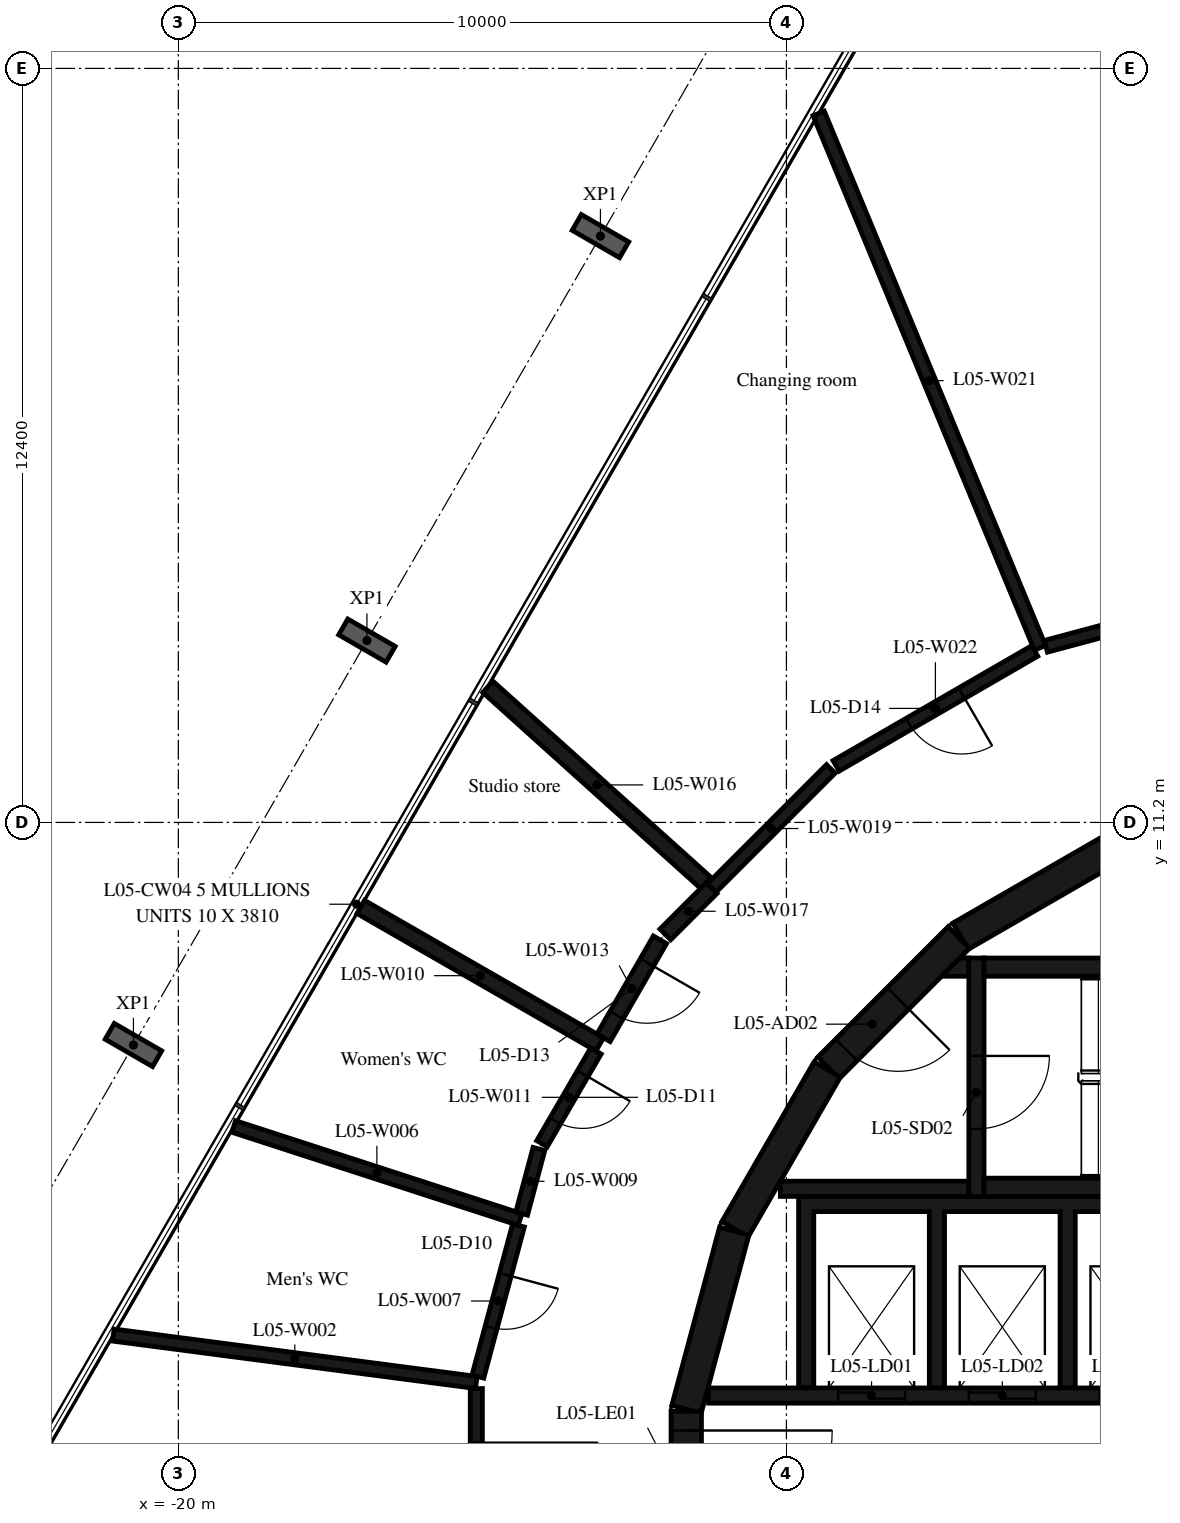
"""IFC4 building model, lengths in metres.
Left out: names, types, materials, properties, quantities, classifications, styles, units other than length and angle.
Written with IfcOpenShell. Run it as: python <this file> out.ifc"""

import sys

from ifc_helpers import new_model, si_unit, direction, frame, frame_2d, origin, origin_2d, place, context, subcontext, project, spatial, polyline, rectangle, i_section, outline, extrude, element, fill, save


model = new_model("IFC4")
c1 = context("Model", 3, precision=1e-05, world=origin(), true_north=direction((0.0, 1.0)))
c2 = subcontext(c1, "Body", "Model", "MODEL_VIEW")
j1 = project(units=[si_unit("LENGTHUNIT", "METRE"), si_unit("PLANEANGLEUNIT", "RADIAN")], contexts=[c1])
p1 = place(None, origin())
s1 = spatial("IfcSite", under=j1, at=p1, CompositionType="ELEMENT")
p2 = place(p1, origin())
s2 = spatial("IfcBuilding", under=s1, at=p2, CompositionType="ELEMENT")
p3 = place(p2, frame((0.0, 0.0, 28.2)))
s3 = spatial("IfcBuildingStorey", under=s2, at=p3, CompositionType="ELEMENT", Elevation=28.2)
for number, where, z_axis, x_axis in (
    (1, (-13.059, 20.842, -0.38), (0.0, 0.0, 1.0), (0.5, 0.866, 0.0)),
    (2, (-16.899, 14.19, -0.38), (0.0, 0.0, 1.0), (0.5, 0.866, 0.0)),
    (3, (-20.739, 7.539, -0.38), (0.0, 0.0, 1.0), (0.5, 0.866, 0.0)),
):
    element("IfcColumn", number, at=place(p3, frame(where, z_axis=z_axis, x_axis=x_axis)), inside=s3, PredefinedType="COLUMN", context=c2, shape_type="SweptSolid", body=[
        extrude(i_section(OverallWidth=0.3, OverallDepth=0.9, WebThickness=0.019, FlangeThickness=0.035, FilletRadius=0.03, at=origin_2d()), origin(), (0.0, 0.0, 1.0), 4.73),
    ])
p4 = place(p3, frame((-4.51, 10.845, 0.0), z_axis=(0.0, 0.0, 1.0), x_axis=(-0.865975092491, -0.500087131594, 0.0)))
e4 = element("IfcWall", 4, at=p4, inside=s3, PredefinedType="SHEAR", context=c2, shape_type="SweptSolid", body=[
    extrude(rectangle(XDim=3.033, YDim=0.5, at=frame_2d((1.516, 0.0))), origin(), (0.0, 0.0, 1.0), 4.35),
])
p5 = place(p3, frame((-7.164, 9.308, 0.0), z_axis=(0.0, 0.0, 1.0), x_axis=(-0.707106781187, -0.707106781187, 0.0)))
e5 = element("IfcWall", 5, at=p5, inside=s3, PredefinedType="SHEAR", context=c2, shape_type="SweptSolid", body=[
    extrude(rectangle(XDim=3.032, YDim=0.5, at=frame_2d((1.516, 0.0))), origin(), (0.0, 0.0, 1.0), 4.35),
])
p6 = place(p5, frame((1.416, 0.0, 0.0)))
e6 = element("IfcOpeningElement", 6, at=p6, cuts=e5, PredefinedType="OPENING", context=c2, shape_type="SweptSolid", body=[
    extrude(rectangle(XDim=1.2, YDim=2.1, at=frame_2d((0.6, 1.05))), frame((0.0, 0.26, 0.0), z_axis=(0.0, -1.0, 0.0), x_axis=(1.0, 0.0, 0.0)), (0.0, 0.0, 1.0), 0.52),
])
for number, where, z_axis, x_axis in (
    (7, (-9.329, 7.137, 0.0), (0.0, 0.0, 1.0), (-0.5, -0.866, 0.0)),
    (8, (-10.858, 4.479, 0.0), (0.0, 0.0, 1.0), (-0.259, -0.966, 0.0)),
):
    element("IfcWall", number, at=place(p3, frame(where, z_axis=z_axis, x_axis=x_axis)), inside=s3, PredefinedType="SHEAR", context=c2, shape_type="SweptSolid", body=[
        extrude(rectangle(XDim=3.033, YDim=0.5, at=frame_2d((1.516, 0.0))), origin(), (0.0, 0.0, 1.0), 4.35),
    ])
p7 = place(p3, frame((-11.647, 1.516, 0.0), z_axis=(0.0, 0.0, 1.0), x_axis=(0.0, -1.0, 0.0)))
e9 = element("IfcWall", 9, at=p7, inside=s3, PredefinedType="SHEAR", context=c2, shape_type="SweptSolid", body=[
    extrude(rectangle(XDim=3.033, YDim=0.5, at=frame_2d((1.516, 0.0))), origin(), (0.0, 0.0, 1.0), 4.35),
])
p8 = place(p7, frame((0.316, 0.0, 0.0)))
e10 = element("IfcOpeningElement", 10, at=p8, cuts=e9, PredefinedType="OPENING", context=c2, shape_type="SweptSolid", body=[
    extrude(rectangle(XDim=2.4, YDim=2.1, at=frame_2d((1.2, 1.05))), frame((0.0, 0.26, 0.0), z_axis=(0.0, -1.0, 0.0), x_axis=(1.0, 0.0, 0.0)), (0.0, 0.0, 1.0), 0.52),
])
for number, where, z_axis, x_axis in (
    (11, (-6.75, 5.2, 0.0), (0.0, 0.0, 1.0), (1.0, 0.0, 0.0)),
    (12, (-6.75, 8.82, 0.0), (0.0, 0.0, 1.0), (1.0, 0.0, 0.0)),
):
    element("IfcWall", number, at=place(p3, frame(where, z_axis=z_axis, x_axis=x_axis)), inside=s3, PredefinedType="SHEAR", context=c2, shape_type="SweptSolid", body=[
        extrude(rectangle(XDim=6.75, YDim=0.3, at=frame_2d((3.375, 0.0))), origin(), (0.0, 0.0, 1.0), 4.35),
    ])
p9 = place(p3, frame((-6.875, 8.97, 0.0), z_axis=(0.0, 0.0, 1.0), x_axis=(0.0, -1.0, 0.0)))
e13 = element("IfcWall", 13, at=p9, inside=s3, PredefinedType="SHEAR", context=c2, shape_type="SweptSolid", body=[
    extrude(rectangle(XDim=3.92, YDim=0.25, at=frame_2d((1.96, 0.0))), origin(), (0.0, 0.0, 1.0), 4.35),
])
p10 = place(p9, frame((1.61, 0.0, 0.0)))
e14 = element("IfcOpeningElement", 14, at=p10, cuts=e13, PredefinedType="OPENING", context=c2, shape_type="SweptSolid", body=[
    extrude(rectangle(XDim=1.2, YDim=2.1, at=frame_2d((0.6, 1.05))), frame((0.0, 0.135, 0.0), z_axis=(0.0, -1.0, 0.0), x_axis=(1.0, 0.0, 0.0)), (0.0, 0.0, 1.0), 0.27),
])
p11 = place(p3, frame((-7.0, 5.175, 0.0), z_axis=(0.0, 0.0, 1.0), x_axis=(-1.0, 0.0, 0.0)))
e15 = element("IfcWall", 15, at=p11, inside=s3, PredefinedType="SHEAR", context=c2, shape_type="SweptSolid", body=[
    extrude(rectangle(XDim=3.1, YDim=0.25, at=frame_2d((1.55, 0.0))), origin(), (0.0, 0.0, 1.0), 4.35),
])
p12 = place(p3, origin())
e16 = element("IfcWall", 16, at=p12, inside=s3, PredefinedType="SHEAR", context=c2, shape_type="SweptSolid", body=[
    extrude(outline(polyline([(-7.148, 8.97), (-7.0, 8.97), (-7.0, 8.67), (-7.448, 8.67), (-7.148, 8.97)])), origin(), (0.0, 0.0, 1.0), 4.35),
])
p13 = place(p3, origin())
e17 = element("IfcWall", 17, at=p13, inside=s3, PredefinedType="SHEAR", context=c2, shape_type="SweptSolid", body=[
    extrude(outline(polyline([(-9.55, 4.8), (-7.65, 4.8), (-7.65, 1.9), (-7.4, 1.9), (-7.4, 4.8), (-5.5, 4.8), (-5.5, 1.9), (-5.25, 1.9), (-5.25, 4.8), (-3.35, 4.8), (-3.35, 1.9), (-3.1, 1.9), (-3.1, 4.8), (-1.2, 4.8), (-1.2, 1.9), (-0.95, 1.9), (-0.95, 4.8), (0.95, 4.8), (0.95, 1.9), (1.2, 1.9), (1.2, 4.8), (3.1, 4.8), (3.1, 1.9), (3.35, 1.9), (3.35, 4.8), (5.25, 4.8), (5.25, 1.9), (5.5, 1.9), (5.5, 4.8), (7.4, 4.8), (7.4, 1.9), (7.65, 1.9), (7.65, 4.8), (9.55, 4.8), (9.55, 1.9), (9.8, 1.9), (9.8, 4.8), (9.8, 5.05), (-9.8, 5.05), (-9.8, 4.8), (-9.8, 1.9), (-9.55, 1.9), (-9.55, 4.8)])), origin(), (0.0, 0.0, 1.0), 4.35),
])
p14 = place(p3, frame((-11.28, 1.775, 0.0), z_axis=(0.0, 0.0, 1.0), x_axis=(1.0, 0.0, 0.0)))
e18 = element("IfcWall", 18, at=p14, inside=s3, PredefinedType="SHEAR", context=c2, shape_type="SweptSolid", body=[
    extrude(rectangle(XDim=14.38, YDim=0.25, at=frame_2d((7.19, 0.0))), origin(), (0.0, 0.0, 1.0), 4.35),
])
p15 = place(p14, frame((2.13, 0.0, 0.0)))
e19 = element("IfcOpeningElement", 19, at=p15, cuts=e18, PredefinedType="OPENING", context=c2, shape_type="SweptSolid", body=[
    extrude(rectangle(XDim=1.1, YDim=2.1, at=frame_2d((0.55, 1.05))), frame((0.0, 0.135, 0.0), z_axis=(0.0, -1.0, 0.0), x_axis=(1.0, 0.0, 0.0)), (0.0, 0.0, 1.0), 0.27),
])
p16 = place(p14, frame((4.28, 0.0, 0.0)))
e20 = element("IfcOpeningElement", 20, at=p16, cuts=e18, PredefinedType="OPENING", context=c2, shape_type="SweptSolid", body=[
    extrude(rectangle(XDim=1.1, YDim=2.1, at=frame_2d((0.55, 1.05))), frame((0.0, 0.135, 0.0), z_axis=(0.0, -1.0, 0.0), x_axis=(1.0, 0.0, 0.0)), (0.0, 0.0, 1.0), 0.27),
])
p17 = place(p14, frame((6.43, 0.0, 0.0)))
e21 = element("IfcOpeningElement", 21, at=p17, cuts=e18, PredefinedType="OPENING", context=c2, shape_type="SweptSolid", body=[
    extrude(rectangle(XDim=1.1, YDim=2.1, at=frame_2d((0.55, 1.05))), frame((0.0, 0.135, 0.0), z_axis=(0.0, -1.0, 0.0), x_axis=(1.0, 0.0, 0.0)), (0.0, 0.0, 1.0), 0.27),
])
p18 = place(p14, frame((8.58, 0.0, 0.0)))
e22 = element("IfcOpeningElement", 22, at=p18, cuts=e18, PredefinedType="OPENING", context=c2, shape_type="SweptSolid", body=[
    extrude(rectangle(XDim=1.1, YDim=2.1, at=frame_2d((0.55, 1.05))), frame((0.0, 0.135, 0.0), z_axis=(0.0, -1.0, 0.0), x_axis=(1.0, 0.0, 0.0)), (0.0, 0.0, 1.0), 0.27),
])
p19 = place(p14, frame((10.83, 0.0, 0.0)))
e23 = element("IfcOpeningElement", 23, at=p19, cuts=e18, PredefinedType="OPENING", context=c2, shape_type="SweptSolid", body=[
    extrude(rectangle(XDim=0.9, YDim=2.1, at=frame_2d((0.45, 1.05))), frame((0.0, 0.135, 0.0), z_axis=(0.0, -1.0, 0.0), x_axis=(1.0, 0.0, 0.0)), (0.0, 0.0, 1.0), 0.27),
])
p20 = place(p14, frame((12.98, 0.0, 0.0)))
e24 = element("IfcOpeningElement", 24, at=p20, cuts=e18, PredefinedType="OPENING", context=c2, shape_type="SweptSolid", body=[
    extrude(rectangle(XDim=0.9, YDim=2.1, at=frame_2d((0.45, 1.05))), frame((0.0, 0.135, 0.0), z_axis=(0.0, -1.0, 0.0), x_axis=(1.0, 0.0, 0.0)), (0.0, 0.0, 1.0), 0.27),
])
p21 = place(p3, frame((-15.1, 1.99, 0.0), z_axis=(0.0, 0.0, 1.0), x_axis=(-0.991571896529, 0.129557608858, 0.0)))
e25 = element("IfcWall", 25, at=p21, inside=s3, PredefinedType="PARTITIONING", context=c2, shape_type="SweptSolid", body=[
    extrude(rectangle(XDim=6.021, YDim=0.2, at=frame_2d((3.01, 0.0))), origin(), (0.0, 0.0, 1.0), 4.35),
])
p22 = place(p3, frame((-15.1, 1.89, 0.0), z_axis=(0.0, 0.0, 1.0), x_axis=(0.0, -1.0, 0.0)))
e26 = element("IfcWall", 26, at=p22, inside=s3, PredefinedType="PARTITIONING", context=c2, shape_type="SweptSolid", body=[
    extrude(rectangle(XDim=3.78, YDim=0.2, at=frame_2d((1.89, 0.0))), origin(), (0.0, 0.0, 1.0), 4.35),
])
p23 = place(p22, frame((0.89, 0.0, 0.0)))
e27 = element("IfcOpeningElement", 27, at=p23, cuts=e26, PredefinedType="OPENING", context=c2, shape_type="SweptSolid", body=[
    extrude(rectangle(XDim=2.0, YDim=2.1, at=frame_2d((1.0, 1.05))), frame((0.0, 0.11, 0.0), z_axis=(0.0, -1.0, 0.0), x_axis=(1.0, 0.0, 0.0)), (0.0, 0.0, 1.0), 0.22),
])
p24 = place(p3, frame((-14.38, 4.67, 0.0), z_axis=(0.0, 0.0, 1.0), x_axis=(-0.951080790776, 0.308942275219, 0.0)))
e28 = element("IfcWall", 28, at=p24, inside=s3, PredefinedType="PARTITIONING", context=c2, shape_type="SweptSolid", body=[
    extrude(rectangle(XDim=4.952, YDim=0.2, at=frame_2d((2.476, 0.0))), origin(), (0.0, 0.0, 1.0), 3.96),
])
p25 = place(p3, frame((-14.406, 4.573, 0.0), z_axis=(0.0, 0.0, 1.0), x_axis=(-0.259408996071, -0.965767556277, 0.0)))
e29 = element("IfcWall", 29, at=p25, inside=s3, PredefinedType="PARTITIONING", context=c2, shape_type="SweptSolid", body=[
    extrude(rectangle(XDim=2.575, YDim=0.2, at=frame_2d((1.288, 0.0))), origin(), (0.0, 0.0, 1.0), 4.35),
])
p26 = place(p25, frame((0.837, 0.0, 0.0)))
e30 = element("IfcOpeningElement", 30, at=p26, cuts=e29, PredefinedType="OPENING", context=c2, shape_type="SweptSolid", body=[
    extrude(rectangle(XDim=0.9, YDim=2.1, at=frame_2d((0.45, 1.05))), frame((0.0, 0.11, 0.0), z_axis=(0.0, -1.0, 0.0), x_axis=(1.0, 0.0, 0.0)), (0.0, 0.0, 1.0), 0.22),
])
p27 = place(p3, frame((-14.07, 5.83, 0.0), z_axis=(0.0, 0.0, 1.0), x_axis=(-0.258159565639, -0.966102292032, 0.0)))
e31 = element("IfcWall", 31, at=p27, inside=s3, PredefinedType="PARTITIONING", context=c2, shape_type="SweptSolid", body=[
    extrude(rectangle(XDim=1.101, YDim=0.2, at=frame_2d((0.55, 0.0))), origin(), (0.0, 0.0, 1.0), 4.35),
])
p28 = place(p3, frame((-13.07, 7.55, 0.0), z_axis=(0.0, 0.0, 1.0), x_axis=(-0.866877794005, 0.498520701938, 0.0)))
e32 = element("IfcWall", 32, at=p28, inside=s3, PredefinedType="PARTITIONING", context=c2, shape_type="SweptSolid", body=[
    extrude(rectangle(XDim=4.533, YDim=0.25, at=frame_2d((2.267, 0.0))), origin(), (0.0, 0.0, 1.0), 4.35),
])
p29 = place(p3, frame((-13.133, 7.442, 0.0), z_axis=(0.0, 0.0, 1.0), x_axis=(-0.502666148297, -0.864480620579, 0.0)))
e33 = element("IfcWall", 33, at=p29, inside=s3, PredefinedType="PARTITIONING", context=c2, shape_type="SweptSolid", body=[
    extrude(rectangle(XDim=1.764, YDim=0.2, at=frame_2d((0.882, 0.0))), origin(), (0.0, 0.0, 1.0), 4.35),
])
p30 = place(p29, frame((0.432, 0.0, 0.0)))
e34 = element("IfcOpeningElement", 34, at=p30, cuts=e33, PredefinedType="OPENING", context=c2, shape_type="SweptSolid", body=[
    extrude(rectangle(XDim=0.9, YDim=2.1, at=frame_2d((0.45, 1.05))), frame((0.0, 0.11, 0.0), z_axis=(0.0, -1.0, 0.0), x_axis=(1.0, 0.0, 0.0)), (0.0, 0.0, 1.0), 0.22),
])
p31 = place(p3, frame((-12.08, 9.27, 0.0), z_axis=(0.0, 0.0, 1.0), x_axis=(-0.498809049979, -0.86671190811, 0.0)))
e35 = element("IfcWall", 35, at=p31, inside=s3, PredefinedType="PARTITIONING", context=c2, shape_type="SweptSolid", body=[
    extrude(rectangle(XDim=1.859, YDim=0.25, at=frame_2d((0.93, 0.0))), origin(), (0.0, 0.0, 1.0), 4.35),
])
p32 = place(p31, frame((0.43, 0.0, 0.0)))
e36 = element("IfcOpeningElement", 36, at=p32, cuts=e35, PredefinedType="OPENING", context=c2, shape_type="SweptSolid", body=[
    extrude(rectangle(XDim=1.0, YDim=2.1, at=frame_2d((0.5, 1.05))), frame((0.0, 0.135, 0.0), z_axis=(0.0, -1.0, 0.0), x_axis=(1.0, 0.0, 0.0)), (0.0, 0.0, 1.0), 0.27),
])
p33 = place(p3, frame((-11.323, 10.204, 0.0), z_axis=(0.0, 0.0, 1.0), x_axis=(-0.743490383827, 0.668746625529, 0.0)))
e37 = element("IfcWall", 37, at=p33, inside=s3, PredefinedType="PARTITIONING", context=c2, shape_type="SweptSolid", body=[
    extrude(rectangle(XDim=4.824, YDim=0.25, at=frame_2d((2.412, 0.0))), origin(), (0.0, 0.0, 1.0), 3.96),
])
p34 = place(p3, frame((-11.23, 10.12, 0.0), z_axis=(0.0, 0.0, 1.0), x_axis=(-0.707106781187, -0.707106781187, 0.0)))
e38 = element("IfcWall", 38, at=p34, inside=s3, PredefinedType="PARTITIONING", context=c2, shape_type="SweptSolid", body=[
    extrude(rectangle(XDim=1.077, YDim=0.25, at=frame_2d((0.539, 0.0))), origin(), (0.0, 0.0, 1.0), 4.35),
])
p35 = place(p3, frame((-9.27, 12.08, 0.0), z_axis=(0.0, 0.0, 1.0), x_axis=(-0.707106781187, -0.707106781187, 0.0)))
e39 = element("IfcWall", 39, at=p35, inside=s3, PredefinedType="PARTITIONING", context=c2, shape_type="SweptSolid", body=[
    extrude(rectangle(XDim=2.772, YDim=0.2, at=frame_2d((1.386, 0.0))), origin(), (0.0, 0.0, 1.0), 4.35),
])
p36 = place(p3, frame((-5.83, 14.07, 0.0), z_axis=(0.0, 0.0, 1.0), x_axis=(-0.382588257379, 0.923918949538, 0.0)))
e40 = element("IfcWall", 40, at=p36, inside=s3, PredefinedType="PARTITIONING", context=c2, shape_type="SweptSolid", body=[
    extrude(rectangle(XDim=9.514, YDim=0.2, at=frame_2d((4.757, 0.0))), origin(), (0.0, 0.0, 1.0), 4.35),
])
p37 = place(p3, frame((-5.917, 14.02, 0.0), z_axis=(0.0, 0.0, 1.0), x_axis=(-0.865591582237, -0.500750649286, 0.0)))
e41 = element("IfcWall", 41, at=p37, inside=s3, PredefinedType="PARTITIONING", context=c2, shape_type="SweptSolid", body=[
    extrude(rectangle(XDim=3.774, YDim=0.2, at=frame_2d((1.887, 0.0))), origin(), (0.0, 0.0, 1.0), 4.35),
])
p38 = place(p37, frame((1.387, 0.0, 0.0)))
e42 = element("IfcOpeningElement", 42, at=p38, cuts=e41, PredefinedType="OPENING", context=c2, shape_type="SweptSolid", body=[
    extrude(rectangle(XDim=1.0, YDim=2.1, at=frame_2d((0.5, 1.05))), frame((0.0, 0.11, 0.0), z_axis=(0.0, -1.0, 0.0), x_axis=(1.0, 0.0, 0.0)), (0.0, 0.0, 1.0), 0.22),
])
p39 = place(p3, frame((-1.99, 15.1, 0.0), z_axis=(0.0, 0.0, 1.0), x_axis=(-0.96585437197, -0.259085569159, 0.0)))
e43 = element("IfcWall", 43, at=p39, inside=s3, PredefinedType="PARTITIONING", context=c2, shape_type="SweptSolid", body=[
    extrude(rectangle(XDim=3.876, YDim=0.2, at=frame_2d((1.938, 0.0))), origin(), (0.0, 0.0, 1.0), 4.35),
])
p40 = place(p10, origin())
e44 = element("IfcDoor", 44, at=p40, inside=s3, OperationType="SINGLE_SWING_LEFT", PredefinedType="DOOR", context=c2, shape_type="SweptSolid", body=[
    extrude(rectangle(XDim=1.2, YDim=2.1, at=frame_2d((0.6, 1.05))), frame((0.0, 0.025, 0.0), z_axis=(0.0, -1.0, 0.0), x_axis=(1.0, 0.0, 0.0)), (0.0, 0.0, 1.0), 0.05),
])
fill(e14, e44)
p41 = place(p6, origin())
e45 = element("IfcDoor", 45, at=p41, inside=s3, OperationType="SINGLE_SWING_RIGHT", PredefinedType="DOOR", context=c2, shape_type="SweptSolid", body=[
    extrude(rectangle(XDim=1.2, YDim=2.1, at=frame_2d((0.6, 1.05))), frame((0.0, 0.025, 0.0), z_axis=(0.0, -1.0, 0.0), x_axis=(1.0, 0.0, 0.0)), (0.0, 0.0, 1.0), 0.05),
])
fill(e6, e45)
p42 = place(p8, origin())
e46 = element("IfcDoor", 46, at=p42, inside=s3, OperationType="DOUBLE_DOOR_SINGLE_SWING", PredefinedType="DOOR", context=c2, shape_type="SweptSolid", body=[
    extrude(rectangle(XDim=2.4, YDim=2.1, at=frame_2d((1.2, 1.05))), frame((0.0, 0.025, 0.0), z_axis=(0.0, -1.0, 0.0), x_axis=(1.0, 0.0, 0.0)), (0.0, 0.0, 1.0), 0.05),
])
fill(e10, e46)
p43 = place(p15, origin())
e47 = element("IfcDoor", 47, at=p43, inside=s3, OperationType="DOUBLE_DOOR_SLIDING", PredefinedType="DOOR", context=c2, shape_type="SweptSolid", body=[
    extrude(rectangle(XDim=1.1, YDim=2.1, at=frame_2d((0.55, 1.05))), frame((0.0, 0.025, 0.0), z_axis=(0.0, -1.0, 0.0), x_axis=(1.0, 0.0, 0.0)), (0.0, 0.0, 1.0), 0.05),
])
fill(e19, e47)
p44 = place(p16, origin())
e48 = element("IfcDoor", 48, at=p44, inside=s3, OperationType="DOUBLE_DOOR_SLIDING", PredefinedType="DOOR", context=c2, shape_type="SweptSolid", body=[
    extrude(rectangle(XDim=1.1, YDim=2.1, at=frame_2d((0.55, 1.05))), frame((0.0, 0.025, 0.0), z_axis=(0.0, -1.0, 0.0), x_axis=(1.0, 0.0, 0.0)), (0.0, 0.0, 1.0), 0.05),
])
fill(e20, e48)
p45 = place(p17, origin())
e49 = element("IfcDoor", 49, at=p45, inside=s3, OperationType="DOUBLE_DOOR_SLIDING", PredefinedType="DOOR", context=c2, shape_type="SweptSolid", body=[
    extrude(rectangle(XDim=1.1, YDim=2.1, at=frame_2d((0.55, 1.05))), frame((0.0, 0.025, 0.0), z_axis=(0.0, -1.0, 0.0), x_axis=(1.0, 0.0, 0.0)), (0.0, 0.0, 1.0), 0.05),
])
fill(e21, e49)
p46 = place(p23, origin())
e50 = element("IfcDoor", 50, at=p46, inside=s3, OperationType="DOUBLE_DOOR_SINGLE_SWING", PredefinedType="DOOR", context=c2, shape_type="SweptSolid", body=[
    extrude(rectangle(XDim=2.0, YDim=2.1, at=frame_2d((1.0, 1.05))), frame((0.0, 0.025, 0.0), z_axis=(0.0, -1.0, 0.0), x_axis=(1.0, 0.0, 0.0)), (0.0, 0.0, 1.0), 0.05),
])
fill(e27, e50)
p47 = place(p26, origin())
e51 = element("IfcDoor", 51, at=p47, inside=s3, OperationType="SINGLE_SWING_LEFT", PredefinedType="DOOR", context=c2, shape_type="SweptSolid", body=[
    extrude(rectangle(XDim=0.9, YDim=2.1, at=frame_2d((0.45, 1.05))), frame((0.0, 0.025, 0.0), z_axis=(0.0, -1.0, 0.0), x_axis=(1.0, 0.0, 0.0)), (0.0, 0.0, 1.0), 0.05),
])
fill(e30, e51)
p48 = place(p30, origin())
e52 = element("IfcDoor", 52, at=p48, inside=s3, OperationType="SINGLE_SWING_LEFT", PredefinedType="DOOR", context=c2, shape_type="SweptSolid", body=[
    extrude(rectangle(XDim=0.9, YDim=2.1, at=frame_2d((0.45, 1.05))), frame((0.0, 0.025, 0.0), z_axis=(0.0, -1.0, 0.0), x_axis=(1.0, 0.0, 0.0)), (0.0, 0.0, 1.0), 0.05),
])
fill(e34, e52)
p49 = place(p32, origin())
e53 = element("IfcDoor", 53, at=p49, inside=s3, OperationType="SINGLE_SWING_LEFT", PredefinedType="DOOR", context=c2, shape_type="SweptSolid", body=[
    extrude(rectangle(XDim=1.0, YDim=2.1, at=frame_2d((0.5, 1.05))), frame((0.0, 0.025, 0.0), z_axis=(0.0, -1.0, 0.0), x_axis=(1.0, 0.0, 0.0)), (0.0, 0.0, 1.0), 0.05),
])
fill(e36, e53)
p50 = place(p38, origin())
e54 = element("IfcDoor", 54, at=p50, inside=s3, OperationType="SINGLE_SWING_LEFT", PredefinedType="DOOR", context=c2, shape_type="SweptSolid", body=[
    extrude(rectangle(XDim=1.0, YDim=2.1, at=frame_2d((0.5, 1.05))), frame((0.0, 0.025, 0.0), z_axis=(0.0, -1.0, 0.0), x_axis=(1.0, 0.0, 0.0)), (0.0, 0.0, 1.0), 0.05),
])
fill(e42, e54)
save(model, sys.argv[1])
